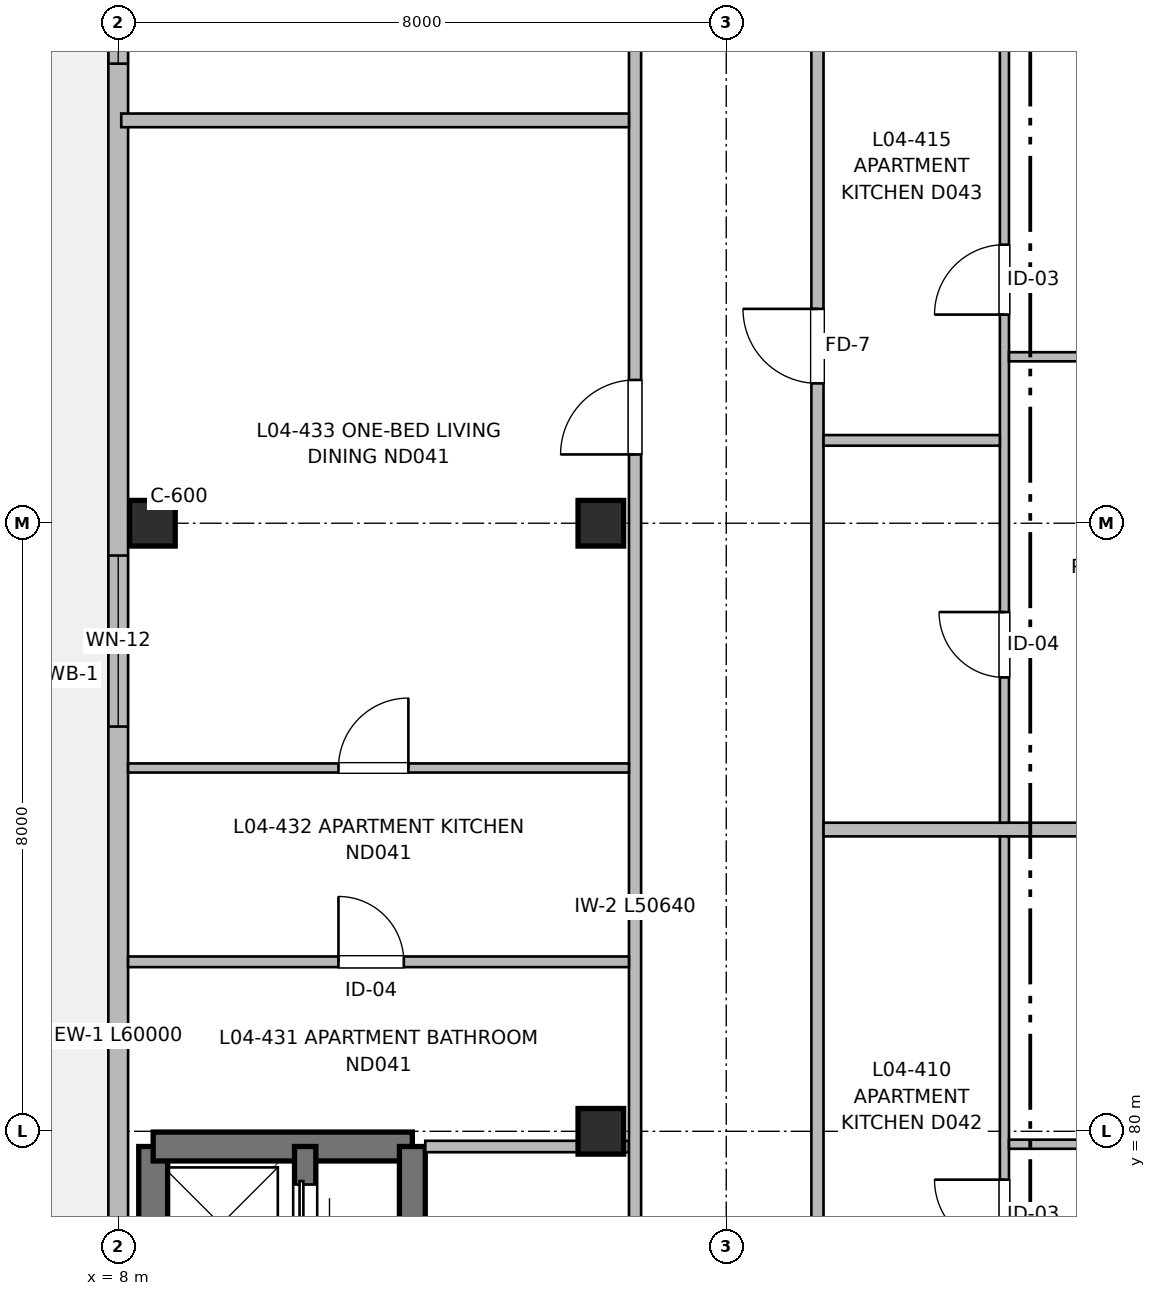
"""IFC4 building model, lengths in metres.
Left out: names, types, materials, properties, quantities, classifications, styles, units other than length and angle.
Written with IfcOpenShell. Run it as: python <this file> out.ifc"""

import sys

from ifc_helpers import new_model, si_unit, direction, frame, frame_2d, origin, origin_2d, place, context, subcontext, project, spatial, rectangle, extrude, element, fill, save


model = new_model("IFC4")
c1 = context("Model", 3, precision=1e-05, world=origin(), true_north=direction((0.0, 1.0)))
c2 = subcontext(c1, "Body", "Model", "MODEL_VIEW")
j1 = project(units=[si_unit("LENGTHUNIT", "METRE"), si_unit("PLANEANGLEUNIT", "RADIAN")], contexts=[c1])
p1 = place(None, origin())
s1 = spatial("IfcSite", under=j1, at=p1, CompositionType="ELEMENT")
p2 = place(p1, origin())
s2 = spatial("IfcBuilding", under=s1, at=p2, CompositionType="ELEMENT")
p3 = place(p2, frame((0.0, 0.0, 13.76)))
s3 = spatial("IfcBuildingStorey", under=s2, at=p3, CompositionType="ELEMENT", Elevation=13.76)
for number, where, z_axis, x_axis in (
    (1, (8.45, 88.0, 0.0), (0.0, 0.0, 1.0), (1.0, 0.0, 0.0)),
    (2, (14.35, 80.0, 0.0), (0.0, 0.0, 1.0), (1.0, 0.0, 0.0)),
    (3, (14.35, 88.0, 0.0), (0.0, 0.0, 1.0), (1.0, 0.0, 0.0)),
):
    element("IfcColumn", number, at=place(p3, frame(where, z_axis=z_axis, x_axis=x_axis)), inside=s3, PredefinedType="COLUMN", context=c2, shape_type="SweptSolid", body=[
        extrude(rectangle(XDim=0.6, YDim=0.6, at=origin_2d()), origin(), (0.0, 0.0, 1.0), 3.2),
    ])
p4 = place(p3, frame((8.46, 67.35, 0.0), z_axis=(0.0, 0.0, 1.0), x_axis=(0.0, 1.0, 0.0)))
e4 = element("IfcWall", 4, at=p4, inside=s3, PredefinedType="SHEAR", context=c2, shape_type="SweptSolid", body=[
    extrude(rectangle(XDim=12.45, YDim=0.38, at=frame_2d((6.225, 0.0))), origin(), (0.0, 0.0, 1.0), 3.2),
])
p5 = place(p4, frame((2.2, 0.0, 0.97)))
e5 = element("IfcOpeningElement", 5, at=p5, cuts=e4, PredefinedType="OPENING", context=c2, shape_type="SweptSolid", body=[
    extrude(rectangle(XDim=0.95, YDim=1.25, at=frame_2d((0.475, 0.625))), frame((0.0, 0.2, 0.0), z_axis=(0.0, -1.0, 0.0), x_axis=(1.0, 0.0, 0.0)), (0.0, 0.0, 1.0), 0.4),
])
p6 = place(p3, frame((8.46, 79.8, 0.0), z_axis=(0.0, 0.0, 1.0), x_axis=(1.0, 0.0, 0.0)))
e6 = element("IfcWall", 6, at=p6, inside=s3, PredefinedType="SHEAR", context=c2, shape_type="SweptSolid", body=[
    extrude(rectangle(XDim=3.41, YDim=0.38, at=frame_2d((1.705, 0.0))), origin(), (0.0, 0.0, 1.0), 3.2),
])
p7 = place(p3, frame((11.87, 79.8, 0.0), z_axis=(0.0, 0.0, 1.0), x_axis=(0.0, -1.0, 0.0)))
e7 = element("IfcWall", 7, at=p7, inside=s3, PredefinedType="SHEAR", context=c2, shape_type="SweptSolid", body=[
    extrude(rectangle(XDim=12.45, YDim=0.34, at=frame_2d((6.225, 0.0))), origin(), (0.0, 0.0, 1.0), 3.2),
])
p8 = place(p7, frame((10.85, 0.0, 0.0)))
e8 = element("IfcOpeningElement", 8, at=p8, cuts=e7, PredefinedType="OPENING", context=c2, shape_type="SweptSolid", body=[
    extrude(rectangle(XDim=1.05, YDim=2.15, at=frame_2d((0.525, 1.075))), frame((0.0, 0.18, 0.0), z_axis=(0.0, -1.0, 0.0), x_axis=(1.0, 0.0, 0.0)), (0.0, 0.0, 1.0), 0.36),
])
p9 = place(p3, frame((10.46, 74.55, 0.0), z_axis=(0.0, 0.0, 1.0), x_axis=(0.0, 1.0, 0.0)))
e9 = element("IfcWall", 9, at=p9, inside=s3, PredefinedType="SHEAR", context=c2, shape_type="SweptSolid", body=[
    extrude(rectangle(XDim=5.25, YDim=0.28, at=frame_2d((2.625, 0.0))), origin(), (0.0, 0.0, 1.0), 3.2),
])
p10 = place(p9, frame((1.15, 0.0, 0.0)))
e10 = element("IfcOpeningElement", 10, at=p10, cuts=e9, PredefinedType="OPENING", context=c2, shape_type="SweptSolid", body=[
    extrude(rectangle(XDim=1.0, YDim=2.15, at=frame_2d((0.5, 1.075))), frame((0.0, 0.15, 0.0), z_axis=(0.0, -1.0, 0.0), x_axis=(1.0, 0.0, 0.0)), (0.0, 0.0, 1.0), 0.3),
])
p11 = place(p9, frame((3.85, 0.0, 0.0)))
e11 = element("IfcOpeningElement", 11, at=p11, cuts=e9, PredefinedType="OPENING", context=c2, shape_type="SweptSolid", body=[
    extrude(rectangle(XDim=0.9, YDim=2.15, at=frame_2d((0.45, 1.075))), frame((0.0, 0.15, 0.0), z_axis=(0.0, -1.0, 0.0), x_axis=(1.0, 0.0, 0.0)), (0.0, 0.0, 1.0), 0.3),
])
p12 = place(p3, frame((8.0, 56.0, 0.0), z_axis=(0.0, 0.0, 1.0), x_axis=(0.0, 1.0, 0.0)))
e12 = element("IfcWall", 12, at=p12, inside=s3, PredefinedType="SOLIDWALL", context=c2, shape_type="SweptSolid", body=[
    extrude(rectangle(XDim=60.0, YDim=0.26, at=frame_2d((30.0, 0.0))), origin(), (0.0, 0.0, 1.0), 2.98),
])
p13 = place(p12, frame((3.686, 0.0, 0.0)))
e13 = element("IfcOpeningElement", 13, at=p13, cuts=e12, PredefinedType="OPENING", context=c2, shape_type="SweptSolid", body=[
    extrude(rectangle(XDim=1.2, YDim=2.2, at=frame_2d((0.6, 1.1))), frame((0.0, 0.14, 0.0), z_axis=(0.0, -1.0, 0.0), x_axis=(1.0, 0.0, 0.0)), (0.0, 0.0, 1.0), 0.28),
])
p14 = place(p12, frame((5.586, 0.0, 0.9)))
e14 = element("IfcOpeningElement", 14, at=p14, cuts=e12, PredefinedType="OPENING", context=c2, shape_type="SweptSolid", body=[
    extrude(rectangle(XDim=1.05, YDim=1.15, at=frame_2d((0.525, 0.575))), frame((0.0, 0.14, 0.0), z_axis=(0.0, -1.0, 0.0), x_axis=(1.0, 0.0, 0.0)), (0.0, 0.0, 1.0), 0.28),
])
p15 = place(p12, frame((12.207, 0.0, 0.82)))
e15 = element("IfcOpeningElement", 15, at=p15, cuts=e12, PredefinedType="OPENING", context=c2, shape_type="SweptSolid", body=[
    extrude(rectangle(XDim=1.3, YDim=1.4, at=frame_2d((0.65, 0.7))), frame((0.0, 0.14, 0.0), z_axis=(0.0, -1.0, 0.0), x_axis=(1.0, 0.0, 0.0)), (0.0, 0.0, 1.0), 0.28),
])
p16 = place(p12, frame((19.079, 0.0, 0.67)))
e16 = element("IfcOpeningElement", 16, at=p16, cuts=e12, PredefinedType="OPENING", context=c2, shape_type="SweptSolid", body=[
    extrude(rectangle(XDim=2.1, YDim=1.55, at=frame_2d((1.05, 0.775))), frame((0.0, 0.14, 0.0), z_axis=(0.0, -1.0, 0.0), x_axis=(1.0, 0.0, 0.0)), (0.0, 0.0, 1.0), 0.28),
])
p17 = place(p12, frame((29.325, 0.0, 0.72)))
e17 = element("IfcOpeningElement", 17, at=p17, cuts=e12, PredefinedType="OPENING", context=c2, shape_type="SweptSolid", body=[
    extrude(rectangle(XDim=2.25, YDim=1.5, at=frame_2d((1.125, 0.75))), frame((0.0, 0.14, 0.0), z_axis=(0.0, -1.0, 0.0), x_axis=(1.0, 0.0, 0.0)), (0.0, 0.0, 1.0), 0.28),
])
p18 = place(p12, frame((38.046, 0.0, 0.9)))
e18 = element("IfcOpeningElement", 18, at=p18, cuts=e12, PredefinedType="OPENING", context=c2, shape_type="SweptSolid", body=[
    extrude(rectangle(XDim=1.05, YDim=1.15, at=frame_2d((0.525, 0.575))), frame((0.0, 0.14, 0.0), z_axis=(0.0, -1.0, 0.0), x_axis=(1.0, 0.0, 0.0)), (0.0, 0.0, 1.0), 0.28),
])
p19 = place(p12, frame((46.543, 0.0, 0.9)))
e19 = element("IfcOpeningElement", 19, at=p19, cuts=e12, PredefinedType="OPENING", context=c2, shape_type="SweptSolid", body=[
    extrude(rectangle(XDim=1.2, YDim=1.05, at=frame_2d((0.6, 0.525))), frame((0.0, 0.14, 0.0), z_axis=(0.0, -1.0, 0.0), x_axis=(1.0, 0.0, 0.0)), (0.0, 0.0, 1.0), 0.28),
])
p20 = place(p12, frame((55.839, 0.0, 0.9)))
e20 = element("IfcOpeningElement", 20, at=p20, cuts=e12, PredefinedType="OPENING", context=c2, shape_type="SweptSolid", body=[
    extrude(rectangle(XDim=0.65, YDim=0.95, at=frame_2d((0.325, 0.475))), frame((0.0, 0.14, 0.0), z_axis=(0.0, -1.0, 0.0), x_axis=(1.0, 0.0, 0.0)), (0.0, 0.0, 1.0), 0.28),
])
p21 = place(p3, frame((12.04, 79.8, 0.0), z_axis=(0.0, 0.0, 1.0), x_axis=(1.0, 0.0, 0.0)))
e21 = element("IfcWall", 21, at=p21, inside=s3, PredefinedType="PARTITIONING", context=c2, shape_type="SweptSolid", body=[
    extrude(rectangle(XDim=2.68, YDim=0.15, at=frame_2d((1.34, 0.0))), origin(), (0.0, 0.0, 1.0), 2.935),
])
p22 = place(p3, frame((14.8, 56.16, 0.0), z_axis=(0.0, 0.0, 1.0), x_axis=(0.0, 1.0, 0.0)))
e22 = element("IfcWall", 22, at=p22, inside=s3, PredefinedType="PARTITIONING", context=c2, shape_type="SweptSolid", body=[
    extrude(rectangle(XDim=50.64, YDim=0.16, at=frame_2d((25.32, 0.0))), origin(), (0.0, 0.0, 1.0), 2.935),
])
p23 = place(p22, frame((12.84, 0.0, 0.0)))
e23 = element("IfcOpeningElement", 23, at=p23, cuts=e22, PredefinedType="OPENING", context=c2, shape_type="SweptSolid", body=[
    extrude(rectangle(XDim=1.1, YDim=2.15, at=frame_2d((0.55, 1.075))), frame((0.0, 0.09, 0.0), z_axis=(0.0, -1.0, 0.0), x_axis=(1.0, 0.0, 0.0)), (0.0, 0.0, 1.0), 0.18),
])
p24 = place(p22, frame((19.24, 0.0, 0.0)))
e24 = element("IfcOpeningElement", 24, at=p24, cuts=e22, PredefinedType="OPENING", context=c2, shape_type="SweptSolid", body=[
    extrude(rectangle(XDim=1.6, YDim=2.15, at=frame_2d((0.8, 1.075))), frame((0.0, 0.09, 0.0), z_axis=(0.0, -1.0, 0.0), x_axis=(1.0, 0.0, 0.0)), (0.0, 0.0, 1.0), 0.18),
])
p25 = place(p22, frame((1.8, 0.0, 0.0)))
e25 = element("IfcOpeningElement", 25, at=p25, cuts=e22, PredefinedType="OPENING", context=c2, shape_type="SweptSolid", body=[
    extrude(rectangle(XDim=0.96, YDim=2.15, at=frame_2d((0.48, 1.075))), frame((0.0, 0.09, 0.0), z_axis=(0.0, -1.0, 0.0), x_axis=(1.0, 0.0, 0.0)), (0.0, 0.0, 1.0), 0.18),
])
p26 = place(p22, frame((32.745, 0.0, 0.0)))
e26 = element("IfcOpeningElement", 26, at=p26, cuts=e22, PredefinedType="OPENING", context=c2, shape_type="SweptSolid", body=[
    extrude(rectangle(XDim=0.98, YDim=2.15, at=frame_2d((0.49, 1.075))), frame((0.0, 0.09, 0.0), z_axis=(0.0, -1.0, 0.0), x_axis=(1.0, 0.0, 0.0)), (0.0, 0.0, 1.0), 0.18),
])
p27 = place(p22, frame((40.955, 0.0, 0.0)))
e27 = element("IfcOpeningElement", 27, at=p27, cuts=e22, PredefinedType="OPENING", context=c2, shape_type="SweptSolid", body=[
    extrude(rectangle(XDim=0.98, YDim=2.15, at=frame_2d((0.49, 1.075))), frame((0.0, 0.09, 0.0), z_axis=(0.0, -1.0, 0.0), x_axis=(1.0, 0.0, 0.0)), (0.0, 0.0, 1.0), 0.18),
])
p28 = place(p3, frame((17.2, 56.16, 0.0), z_axis=(0.0, 0.0, 1.0), x_axis=(0.0, 1.0, 0.0)))
e28 = element("IfcWall", 28, at=p28, inside=s3, PredefinedType="PARTITIONING", context=c2, shape_type="SweptSolid", body=[
    extrude(rectangle(XDim=50.64, YDim=0.16, at=frame_2d((25.32, 0.0))), origin(), (0.0, 0.0, 1.0), 2.935),
])
p29 = place(p28, frame((6.99, 0.0, 0.0)))
e29 = element("IfcOpeningElement", 29, at=p29, cuts=e28, PredefinedType="OPENING", context=c2, shape_type="SweptSolid", body=[
    extrude(rectangle(XDim=0.98, YDim=2.15, at=frame_2d((0.49, 1.075))), frame((0.0, 0.09, 0.0), z_axis=(0.0, -1.0, 0.0), x_axis=(1.0, 0.0, 0.0)), (0.0, 0.0, 1.0), 0.18),
])
p30 = place(p28, frame((20.92, 0.0, 0.0)))
e30 = element("IfcOpeningElement", 30, at=p30, cuts=e28, PredefinedType="OPENING", context=c2, shape_type="SweptSolid", body=[
    extrude(rectangle(XDim=0.98, YDim=2.15, at=frame_2d((0.49, 1.075))), frame((0.0, 0.09, 0.0), z_axis=(0.0, -1.0, 0.0), x_axis=(1.0, 0.0, 0.0)), (0.0, 0.0, 1.0), 0.18),
])
p31 = place(p28, frame((33.68, 0.0, 0.0)))
e31 = element("IfcOpeningElement", 31, at=p31, cuts=e28, PredefinedType="OPENING", context=c2, shape_type="SweptSolid", body=[
    extrude(rectangle(XDim=0.98, YDim=2.15, at=frame_2d((0.49, 1.075))), frame((0.0, 0.09, 0.0), z_axis=(0.0, -1.0, 0.0), x_axis=(1.0, 0.0, 0.0)), (0.0, 0.0, 1.0), 0.18),
])
p32 = place(p28, frame((45.08, 0.0, 0.0)))
e32 = element("IfcOpeningElement", 32, at=p32, cuts=e28, PredefinedType="OPENING", context=c2, shape_type="SweptSolid", body=[
    extrude(rectangle(XDim=0.98, YDim=2.15, at=frame_2d((0.49, 1.075))), frame((0.0, 0.09, 0.0), z_axis=(0.0, -1.0, 0.0), x_axis=(1.0, 0.0, 0.0)), (0.0, 0.0, 1.0), 0.18),
])
p33 = place(p3, frame((17.28, 83.97, 0.0), z_axis=(0.0, 0.0, 1.0), x_axis=(1.0, 0.0, 0.0)))
e33 = element("IfcWall", 33, at=p33, inside=s3, PredefinedType="PARTITIONING", context=c2, shape_type="SweptSolid", body=[
    extrude(rectangle(XDim=6.59, YDim=0.18, at=frame_2d((3.295, 0.0))), origin(), (0.0, 0.0, 1.0), 2.935),
])
p34 = place(p3, frame((19.66, 69.9, 0.0), z_axis=(0.0, 0.0, 1.0), x_axis=(0.0, 1.0, 0.0)))
e34 = element("IfcWall", 34, at=p34, inside=s3, PredefinedType="PARTITIONING", context=c2, shape_type="SweptSolid", body=[
    extrude(rectangle(XDim=13.98, YDim=0.12, at=frame_2d((6.99, 0.0))), origin(), (0.0, 0.0, 1.0), 2.935),
])
p35 = place(p34, frame((2.443, 0.0, 0.0)))
e35 = element("IfcOpeningElement", 35, at=p35, cuts=e34, PredefinedType="OPENING", context=c2, shape_type="SweptSolid", body=[
    extrude(rectangle(XDim=0.86, YDim=2.1, at=frame_2d((0.43, 1.05))), frame((0.0, 0.07, 0.0), z_axis=(0.0, -1.0, 0.0), x_axis=(1.0, 0.0, 0.0)), (0.0, 0.0, 1.0), 0.14),
])
p36 = place(p34, frame((8.544, 0.0, 0.0)))
e36 = element("IfcOpeningElement", 36, at=p36, cuts=e34, PredefinedType="OPENING", context=c2, shape_type="SweptSolid", body=[
    extrude(rectangle(XDim=0.92, YDim=2.1, at=frame_2d((0.46, 1.05))), frame((0.0, 0.07, 0.0), z_axis=(0.0, -1.0, 0.0), x_axis=(1.0, 0.0, 0.0)), (0.0, 0.0, 1.0), 0.14),
])
p37 = place(p3, frame((19.72, 79.83, 0.0), z_axis=(0.0, 0.0, 1.0), x_axis=(1.0, 0.0, 0.0)))
e37 = element("IfcWall", 37, at=p37, inside=s3, PredefinedType="PARTITIONING", context=c2, shape_type="SweptSolid", body=[
    extrude(rectangle(XDim=4.15, YDim=0.12, at=frame_2d((2.075, 0.0))), origin(), (0.0, 0.0, 1.0), 2.53),
])
p38 = place(p37, frame((1.635, 0.0, 0.0)))
e38 = element("IfcOpeningElement", 38, at=p38, cuts=e37, PredefinedType="OPENING", context=c2, shape_type="SweptSolid", body=[
    extrude(rectangle(XDim=0.88, YDim=2.1, at=frame_2d((0.44, 1.05))), frame((0.0, 0.07, 0.0), z_axis=(0.0, -1.0, 0.0), x_axis=(1.0, 0.0, 0.0)), (0.0, 0.0, 1.0), 0.14),
])
p39 = place(p3, frame((19.66, 84.06, 0.0), z_axis=(0.0, 0.0, 1.0), x_axis=(0.0, 1.0, 0.0)))
e39 = element("IfcWall", 39, at=p39, inside=s3, PredefinedType="PARTITIONING", context=c2, shape_type="SweptSolid", body=[
    extrude(rectangle(XDim=10.94, YDim=0.12, at=frame_2d((5.47, 0.0))), origin(), (0.0, 0.0, 1.0), 2.935),
])
p40 = place(p39, frame((1.911, 0.0, 0.0)))
e40 = element("IfcOpeningElement", 40, at=p40, cuts=e39, PredefinedType="OPENING", context=c2, shape_type="SweptSolid", body=[
    extrude(rectangle(XDim=0.86, YDim=2.1, at=frame_2d((0.43, 1.05))), frame((0.0, 0.07, 0.0), z_axis=(0.0, -1.0, 0.0), x_axis=(1.0, 0.0, 0.0)), (0.0, 0.0, 1.0), 0.14),
])
p41 = place(p39, frame((6.685, 0.0, 0.0)))
e41 = element("IfcOpeningElement", 41, at=p41, cuts=e39, PredefinedType="OPENING", context=c2, shape_type="SweptSolid", body=[
    extrude(rectangle(XDim=0.92, YDim=2.1, at=frame_2d((0.46, 1.05))), frame((0.0, 0.07, 0.0), z_axis=(0.0, -1.0, 0.0), x_axis=(1.0, 0.0, 0.0)), (0.0, 0.0, 1.0), 0.14),
])
p42 = place(p3, frame((17.28, 89.09, 0.0), z_axis=(0.0, 0.0, 1.0), x_axis=(1.0, 0.0, 0.0)))
e42 = element("IfcWall", 42, at=p42, inside=s3, PredefinedType="PARTITIONING", context=c2, shape_type="SweptSolid", body=[
    extrude(rectangle(XDim=2.32, YDim=0.14, at=frame_2d((1.16, 0.0))), origin(), (0.0, 0.0, 1.0), 2.935),
])
p43 = place(p3, frame((19.72, 90.19, 0.0), z_axis=(0.0, 0.0, 1.0), x_axis=(1.0, 0.0, 0.0)))
e43 = element("IfcWall", 43, at=p43, inside=s3, PredefinedType="PARTITIONING", context=c2, shape_type="SweptSolid", body=[
    extrude(rectangle(XDim=5.263, YDim=0.12, at=frame_2d((2.632, 0.0))), origin(), (0.0, 0.0, 1.0), 2.935),
])
p44 = place(p43, frame((1.625, 0.0, 0.0)))
e44 = element("IfcOpeningElement", 44, at=p44, cuts=e43, PredefinedType="OPENING", context=c2, shape_type="SweptSolid", body=[
    extrude(rectangle(XDim=0.9, YDim=2.1, at=frame_2d((0.45, 1.05))), frame((0.0, 0.07, 0.0), z_axis=(0.0, -1.0, 0.0), x_axis=(1.0, 0.0, 0.0)), (0.0, 0.0, 1.0), 0.14),
])
p45 = place(p3, frame((8.04, 93.3, 0.0), z_axis=(0.0, 0.0, 1.0), x_axis=(1.0, 0.0, 0.0)))
e45 = element("IfcWall", 45, at=p45, inside=s3, PredefinedType="PARTITIONING", context=c2, shape_type="SweptSolid", body=[
    extrude(rectangle(XDim=6.68, YDim=0.18, at=frame_2d((3.34, 0.0))), origin(), (0.0, 0.0, 1.0), 2.935),
])
p46 = place(p3, frame((8.13, 82.23, 0.0), z_axis=(0.0, 0.0, 1.0), x_axis=(1.0, 0.0, 0.0)))
e46 = element("IfcWall", 46, at=p46, inside=s3, PredefinedType="PARTITIONING", context=c2, shape_type="SweptSolid", body=[
    extrude(rectangle(XDim=6.59, YDim=0.14, at=frame_2d((3.295, 0.0))), origin(), (0.0, 0.0, 1.0), 2.935),
])
p47 = place(p46, frame((2.768, 0.0, 0.0)))
e47 = element("IfcOpeningElement", 47, at=p47, cuts=e46, PredefinedType="OPENING", context=c2, shape_type="SweptSolid", body=[
    extrude(rectangle(XDim=0.86, YDim=2.1, at=frame_2d((0.43, 1.05))), frame((0.0, 0.08, 0.0), z_axis=(0.0, -1.0, 0.0), x_axis=(1.0, 0.0, 0.0)), (0.0, 0.0, 1.0), 0.16),
])
p48 = place(p3, frame((8.13, 84.78, 0.0), z_axis=(0.0, 0.0, 1.0), x_axis=(1.0, 0.0, 0.0)))
e48 = element("IfcWall", 48, at=p48, inside=s3, PredefinedType="PARTITIONING", context=c2, shape_type="SweptSolid", body=[
    extrude(rectangle(XDim=6.59, YDim=0.12, at=frame_2d((3.295, 0.0))), origin(), (0.0, 0.0, 1.0), 2.935),
])
p49 = place(p48, frame((2.768, 0.0, 0.0)))
e49 = element("IfcOpeningElement", 49, at=p49, cuts=e48, PredefinedType="OPENING", context=c2, shape_type="SweptSolid", body=[
    extrude(rectangle(XDim=0.92, YDim=2.1, at=frame_2d((0.46, 1.05))), frame((0.0, 0.07, 0.0), z_axis=(0.0, -1.0, 0.0), x_axis=(1.0, 0.0, 0.0)), (0.0, 0.0, 1.0), 0.14),
])
p50 = place(p11, origin())
e50 = element("IfcDoor", 50, at=p50, inside=s3, OperationType="SLIDING_TO_RIGHT", PredefinedType="DOOR", context=c2, shape_type="SweptSolid", body=[
    extrude(rectangle(XDim=0.9, YDim=2.15, at=frame_2d((0.45, 1.075))), frame((0.0, 0.025, 0.0), z_axis=(0.0, -1.0, 0.0), x_axis=(1.0, 0.0, 0.0)), (0.0, 0.0, 1.0), 0.05),
])
fill(e11, e50)
p51 = place(p17, origin())
e51 = element("IfcWindow", 51, at=p51, inside=s3, PartitioningType="SINGLE_PANEL", PredefinedType="WINDOW", context=c2, shape_type="SweptSolid", body=[
    extrude(rectangle(XDim=2.25, YDim=1.5, at=frame_2d((1.125, 0.75))), frame((0.0, 0.03, 0.0), z_axis=(0.0, -1.0, 0.0), x_axis=(1.0, 0.0, 0.0)), (0.0, 0.0, 1.0), 0.06),
])
fill(e17, e51)
p52 = place(p18, origin())
e52 = element("IfcWindow", 52, at=p52, inside=s3, PartitioningType="SINGLE_PANEL", PredefinedType="WINDOW", context=c2, shape_type="SweptSolid", body=[
    extrude(rectangle(XDim=1.05, YDim=1.15, at=frame_2d((0.525, 0.575))), frame((0.0, 0.03, 0.0), z_axis=(0.0, -1.0, 0.0), x_axis=(1.0, 0.0, 0.0)), (0.0, 0.0, 1.0), 0.06),
])
fill(e18, e52)
p53 = place(p36, origin())
e53 = element("IfcDoor", 53, at=p53, inside=s3, OperationType="SINGLE_SWING_RIGHT", PredefinedType="DOOR", context=c2, shape_type="SweptSolid", body=[
    extrude(rectangle(XDim=0.92, YDim=2.1, at=frame_2d((0.46, 1.05))), frame((0.0, 0.025, 0.0), z_axis=(0.0, -1.0, 0.0), x_axis=(1.0, 0.0, 0.0)), (0.0, 0.0, 1.0), 0.05),
])
fill(e36, e53)
p54 = place(p40, origin())
e54 = element("IfcDoor", 54, at=p54, inside=s3, OperationType="SINGLE_SWING_RIGHT", PredefinedType="DOOR", context=c2, shape_type="SweptSolid", body=[
    extrude(rectangle(XDim=0.86, YDim=2.1, at=frame_2d((0.43, 1.05))), frame((0.0, 0.025, 0.0), z_axis=(0.0, -1.0, 0.0), x_axis=(1.0, 0.0, 0.0)), (0.0, 0.0, 1.0), 0.05),
])
fill(e40, e54)
p55 = place(p41, origin())
e55 = element("IfcDoor", 55, at=p55, inside=s3, OperationType="SINGLE_SWING_LEFT", PredefinedType="DOOR", context=c2, shape_type="SweptSolid", body=[
    extrude(rectangle(XDim=0.92, YDim=2.1, at=frame_2d((0.46, 1.05))), frame((0.0, 0.025, 0.0), z_axis=(0.0, -1.0, 0.0), x_axis=(1.0, 0.0, 0.0)), (0.0, 0.0, 1.0), 0.05),
])
fill(e41, e55)
p56 = place(p31, origin())
e56 = element("IfcDoor", 56, at=p56, inside=s3, OperationType="SINGLE_SWING_RIGHT", PredefinedType="DOOR", context=c2, shape_type="SweptSolid", body=[
    extrude(rectangle(XDim=0.98, YDim=2.15, at=frame_2d((0.49, 1.075))), frame((0.0, 0.025, 0.0), z_axis=(0.0, -1.0, 0.0), x_axis=(1.0, 0.0, 0.0)), (0.0, 0.0, 1.0), 0.05),
])
fill(e31, e56)
p57 = place(p47, origin())
e57 = element("IfcDoor", 57, at=p57, inside=s3, OperationType="SINGLE_SWING_LEFT", PredefinedType="DOOR", context=c2, shape_type="SweptSolid", body=[
    extrude(rectangle(XDim=0.86, YDim=2.1, at=frame_2d((0.43, 1.05))), frame((0.0, 0.025, 0.0), z_axis=(0.0, -1.0, 0.0), x_axis=(1.0, 0.0, 0.0)), (0.0, 0.0, 1.0), 0.05),
])
fill(e47, e57)
p58 = place(p49, origin())
e58 = element("IfcDoor", 58, at=p58, inside=s3, OperationType="SINGLE_SWING_RIGHT", PredefinedType="DOOR", context=c2, shape_type="SweptSolid", body=[
    extrude(rectangle(XDim=0.92, YDim=2.1, at=frame_2d((0.46, 1.05))), frame((0.0, 0.025, 0.0), z_axis=(0.0, -1.0, 0.0), x_axis=(1.0, 0.0, 0.0)), (0.0, 0.0, 1.0), 0.05),
])
fill(e49, e58)
p59 = place(p26, origin())
e59 = element("IfcDoor", 59, at=p59, inside=s3, OperationType="SINGLE_SWING_LEFT", PredefinedType="DOOR", context=c2, shape_type="SweptSolid", body=[
    extrude(rectangle(XDim=0.98, YDim=2.15, at=frame_2d((0.49, 1.075))), frame((0.0, 0.025, 0.0), z_axis=(0.0, -1.0, 0.0), x_axis=(1.0, 0.0, 0.0)), (0.0, 0.0, 1.0), 0.05),
])
fill(e26, e59)
save(model, sys.argv[1])
